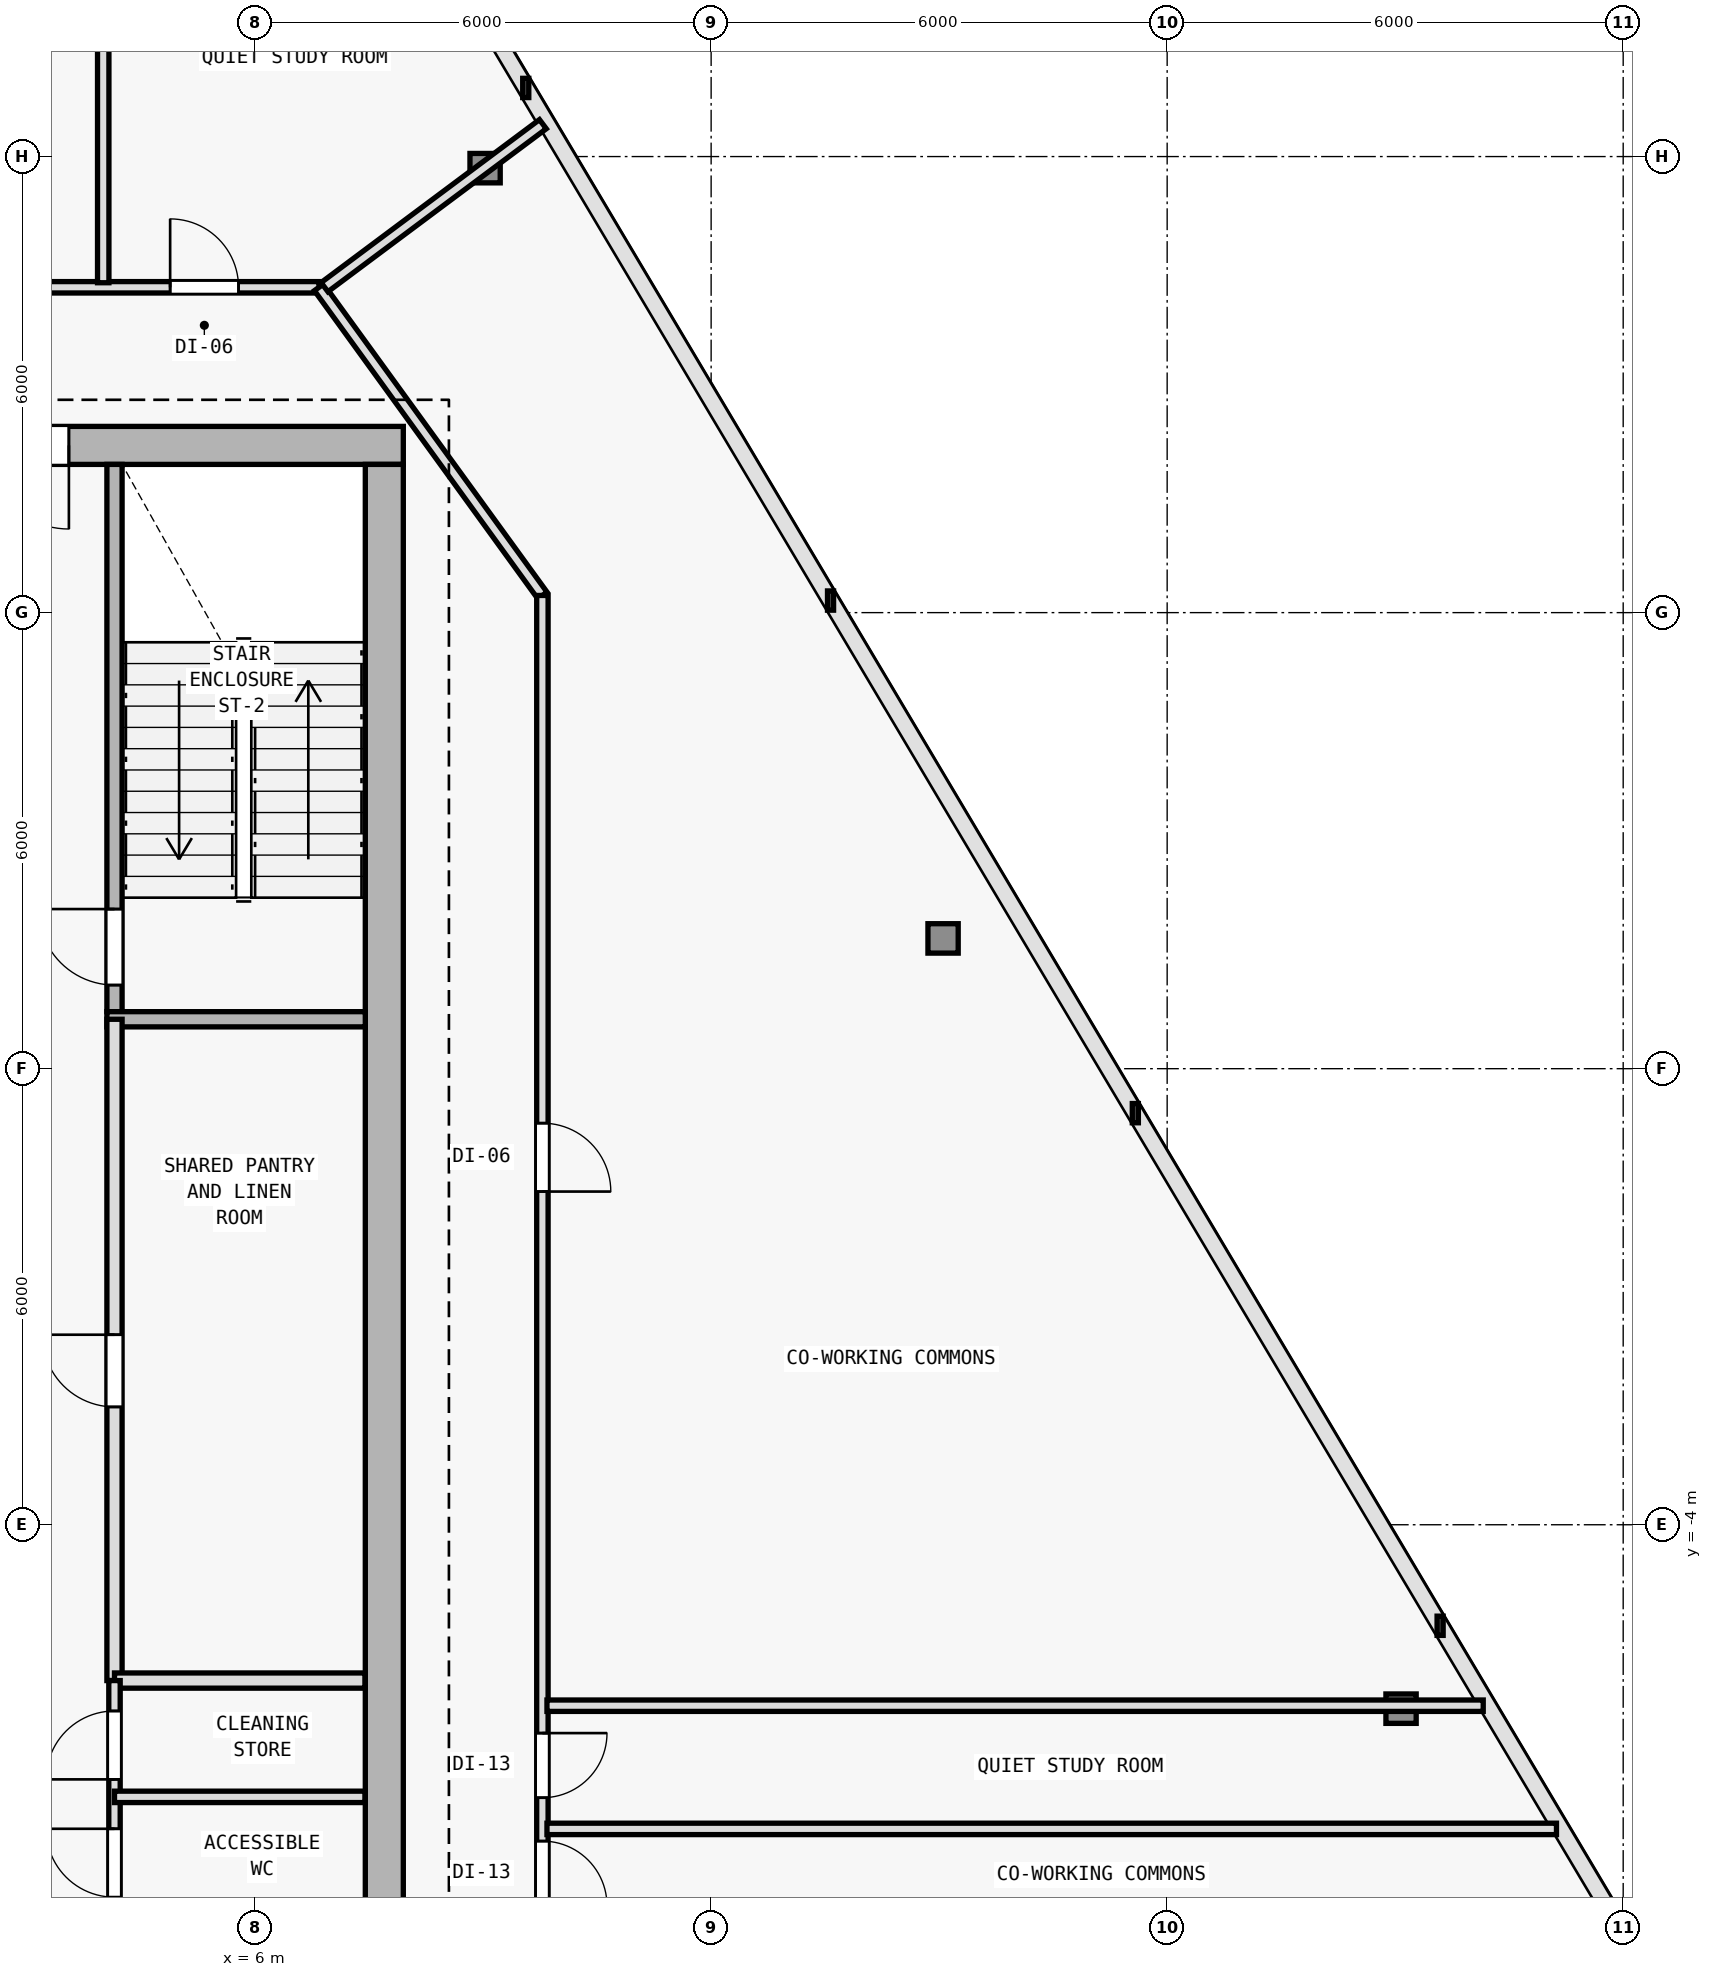
"""IFC4 building model, lengths in metres.
Left out: names, types, materials, properties, quantities, classifications, styles, units other than length and angle.
Written with IfcOpenShell. Run it as: python <this file> out.ifc"""

import sys

from ifc_helpers import new_model, si_unit, direction, frame, frame_2d, origin, origin_2d, place, context, subcontext, project, spatial, rectangle, i_section, extrude, element, fill, save


model = new_model("IFC4")
c1 = context("Model", 3, precision=1e-05, world=origin(), true_north=direction((0.0, 1.0)))
c2 = subcontext(c1, "Body", "Model", "MODEL_VIEW")
j1 = project(units=[si_unit("LENGTHUNIT", "METRE"), si_unit("PLANEANGLEUNIT", "RADIAN")], contexts=[c1])
p1 = place(None, origin())
s1 = spatial("IfcSite", under=j1, at=p1, CompositionType="ELEMENT")
p2 = place(p1, origin())
s2 = spatial("IfcBuilding", under=s1, at=p2, CompositionType="ELEMENT")
p3 = place(p2, frame((0.0, 0.0, 190.2)))
s3 = spatial("IfcBuildingStorey", under=s2, at=p3, CompositionType="ELEMENT", Elevation=190.2)
for number, where, z_axis, x_axis in (
    (1, (7.7, 10.2, 0.0), (0.0, 0.0, 1.0), (1.0, 0.0, 0.0)),
    (2, (7.7, 0.4, 0.0), (0.0, 0.0, 1.0), (1.0, 0.0, 0.0)),
):
    element("IfcColumn", number, at=place(p3, frame(where, z_axis=z_axis, x_axis=x_axis)), inside=s3, PredefinedType="COLUMN", context=c2, shape_type="SweptSolid", body=[
        extrude(i_section(OverallWidth=0.404, OverallDepth=0.407, WebThickness=0.017, FlangeThickness=0.028, FilletRadius=0.015, at=origin_2d()), origin(), (0.0, 0.0, 1.0), 4.5),
    ])
p4 = place(p3, frame((21.077, -6.42, 0.006), z_axis=(-0.020876646911, 0.017288473223, 0.999632569651), x_axis=(-0.637813971185, -0.770190455771, 0.0)))
e3 = element("IfcColumn", 3, at=p4, inside=s3, PredefinedType="COLUMN", context=c2, shape_type="SweptSolid", body=[
    extrude(i_section(OverallWidth=0.398, OverallDepth=0.387, WebThickness=0.013, FlangeThickness=0.022, FilletRadius=0.015, at=origin_2d()), origin(), (0.0, 0.0, 1.0), 4.491),
])
p5 = place(p3, frame((15.052, 3.714, 0.006), z_axis=(-0.015171571571, 0.007667353375, 0.999855507115), x_axis=(-0.451048184688, -0.89249959949, 0.0)))
e4 = element("IfcColumn", 4, at=p5, inside=s3, PredefinedType="COLUMN", context=c2, shape_type="SweptSolid", body=[
    extrude(i_section(OverallWidth=0.398, OverallDepth=0.387, WebThickness=0.013, FlangeThickness=0.022, FilletRadius=0.015, at=origin_2d()), origin(), (0.0, 0.0, 1.0), 4.49),
])
p6 = place(p3, frame((9.026, 13.847, 0.006), z_axis=(-0.009354007007, -0.002012199182, 0.999954225756), x_axis=(0.210305364179, -0.977635746993, 0.0)))
e5 = element("IfcColumn", 5, at=p6, inside=s3, PredefinedType="COLUMN", context=c2, shape_type="SweptSolid", body=[
    extrude(i_section(OverallWidth=0.398, OverallDepth=0.387, WebThickness=0.013, FlangeThickness=0.022, FilletRadius=0.015, at=origin_2d()), origin(), (0.0, 0.0, 1.0), 4.489),
])
p7 = place(p3, frame((7.95, 10.2, 0.0), z_axis=(0.0, 0.0, 1.0), x_axis=(-1.0, 0.0, 0.0)))
e6 = element("IfcWall", 6, at=p7, inside=s3, PredefinedType="SHEAR", context=c2, shape_type="SweptSolid", body=[
    extrude(rectangle(XDim=15.9, YDim=0.5, at=frame_2d((7.95, 0.0))), origin(), (0.0, 0.0, 1.0), 4.25),
])
p8 = place(p7, frame((4.4, 0.0, 0.0)))
e7 = element("IfcOpeningElement", 7, at=p8, cuts=e6, PredefinedType="OPENING", context=c2, shape_type="SweptSolid", body=[
    extrude(rectangle(XDim=1.1, YDim=2.15, at=frame_2d((0.55, 1.075))), frame((0.0, 0.26, 0.0), z_axis=(0.0, -1.0, 0.0), x_axis=(1.0, 0.0, 0.0)), (0.0, 0.0, 1.0), 0.52),
])
p9 = place(p3, frame((7.7, 9.95, 0.0), z_axis=(0.0, 0.0, 1.0), x_axis=(0.0, -1.0, 0.0)))
e8 = element("IfcWall", 8, at=p9, inside=s3, PredefinedType="SHEAR", context=c2, shape_type="SweptSolid", body=[
    extrude(rectangle(XDim=19.1, YDim=0.5, at=frame_2d((9.55, 0.0))), origin(), (0.0, 0.0, 1.0), 4.25),
])
p10 = place(p3, frame((4.15, 2.75, 0.0), z_axis=(0.0, 0.0, 1.0), x_axis=(0.0, 1.0, 0.0)))
e9 = element("IfcWall", 9, at=p10, inside=s3, PredefinedType="SOLIDWALL", context=c2, shape_type="SweptSolid", body=[
    extrude(rectangle(XDim=7.2, YDim=0.2, at=frame_2d((3.6, 0.0))), origin(), (0.0, 0.0, 1.0), 4.25),
])
p11 = place(p10, frame((0.35, 0.0, 0.0)))
e10 = element("IfcOpeningElement", 10, at=p11, cuts=e9, PredefinedType="OPENING", context=c2, shape_type="SweptSolid", body=[
    extrude(rectangle(XDim=1.0, YDim=2.15, at=frame_2d((0.5, 1.075))), frame((0.0, 0.11, 0.0), z_axis=(0.0, -1.0, 0.0), x_axis=(1.0, 0.0, 0.0)), (0.0, 0.0, 1.0), 0.22),
])
p12 = place(p3, frame((4.05, 2.65, 0.0), z_axis=(0.0, 0.0, 1.0), x_axis=(1.0, 0.0, 0.0)))
e11 = element("IfcWall", 11, at=p12, inside=s3, PredefinedType="SOLIDWALL", context=c2, shape_type="SweptSolid", body=[
    extrude(rectangle(XDim=3.4, YDim=0.2, at=frame_2d((1.7, 0.0))), origin(), (0.0, 0.0, 1.0), 4.25),
])
p13 = place(p3, frame((4.15, -6.05, 0.0), z_axis=(0.0, 0.0, 1.0), x_axis=(0.0, 1.0, 0.0)))
e12 = element("IfcWall", 12, at=p13, inside=s3, PredefinedType="SOLIDWALL", context=c2, shape_type="SweptSolid", body=[
    extrude(rectangle(XDim=8.7, YDim=0.2, at=frame_2d((4.35, 0.0))), origin(), (0.0, 0.0, 1.0), 4.25),
])
p14 = place(p13, frame((3.6, 0.0, 0.0)))
e13 = element("IfcOpeningElement", 13, at=p14, cuts=e12, PredefinedType="OPENING", context=c2, shape_type="SweptSolid", body=[
    extrude(rectangle(XDim=0.95, YDim=2.1, at=frame_2d((0.475, 1.05))), frame((0.0, 0.11, 0.0), z_axis=(0.0, -1.0, 0.0), x_axis=(1.0, 0.0, 0.0)), (0.0, 0.0, 1.0), 0.22),
])
p15 = place(p3, frame((4.15, -6.05, 0.0), z_axis=(0.0, 0.0, 1.0), x_axis=(1.0, 0.0, 0.0)))
e14 = element("IfcWall", 14, at=p15, inside=s3, PredefinedType="SOLIDWALL", context=c2, shape_type="SweptSolid", body=[
    extrude(rectangle(XDim=3.295, YDim=0.2, at=frame_2d((1.647, 0.0))), origin(), (0.0, 0.0, 1.0), 4.25),
])
p16 = place(p3, frame((4.15, -9.145, 0.0), z_axis=(0.0, 0.0, 1.0), x_axis=(0.0, 1.0, 0.0)))
e15 = element("IfcWall", 15, at=p16, inside=s3, PredefinedType="PARTITIONING", context=c2, shape_type="SweptSolid", body=[
    extrude(rectangle(XDim=3.095, YDim=0.15, at=frame_2d((1.547, 0.0))), origin(), (0.0, 0.0, 1.0), 4.25),
])
p17 = place(p16, frame((0.245, 0.0, 0.0)))
e16 = element("IfcOpeningElement", 16, at=p17, cuts=e15, PredefinedType="OPENING", context=c2, shape_type="SweptSolid", body=[
    extrude(rectangle(XDim=0.9, YDim=2.1, at=frame_2d((0.45, 1.05))), frame((0.0, 0.085, 0.0), z_axis=(0.0, -1.0, 0.0), x_axis=(1.0, 0.0, 0.0)), (0.0, 0.0, 1.0), 0.17),
])
p18 = place(p16, frame((1.795, 0.0, 0.0)))
e17 = element("IfcOpeningElement", 17, at=p18, cuts=e15, PredefinedType="OPENING", context=c2, shape_type="SweptSolid", body=[
    extrude(rectangle(XDim=0.9, YDim=2.1, at=frame_2d((0.45, 1.05))), frame((0.0, 0.085, 0.0), z_axis=(0.0, -1.0, 0.0), x_axis=(1.0, 0.0, 0.0)), (0.0, 0.0, 1.0), 0.17),
])
p19 = place(p3, frame((4.15, -7.58, 0.0), z_axis=(0.0, 0.0, 1.0), x_axis=(1.0, 0.0, 0.0)))
e18 = element("IfcWall", 18, at=p19, inside=s3, PredefinedType="PARTITIONING", context=c2, shape_type="SweptSolid", body=[
    extrude(rectangle(XDim=3.295, YDim=0.15, at=frame_2d((1.647, 0.0))), origin(), (0.0, 0.0, 1.0), 4.25),
])
p20 = place(p3, frame((-6.841, 12.28, 0.0), z_axis=(0.0, 0.0, 1.0), x_axis=(1.0, 0.0, 0.0)))
e19 = element("IfcWall", 19, at=p20, inside=s3, PredefinedType="PARTITIONING", context=c2, shape_type="SweptSolid", body=[
    extrude(rectangle(XDim=13.682, YDim=0.15, at=frame_2d((6.841, 0.0))), origin(), (0.0, 0.0, 1.0), 3.905),
])
p21 = place(p20, frame((11.723, 0.0, 0.0)))
e20 = element("IfcOpeningElement", 20, at=p21, cuts=e19, PredefinedType="OPENING", context=c2, shape_type="SweptSolid", body=[
    extrude(rectangle(XDim=0.9, YDim=2.1, at=frame_2d((0.45, 1.05))), frame((0.0, 0.085, 0.0), z_axis=(0.0, -1.0, 0.0), x_axis=(1.0, 0.0, 0.0)), (0.0, 0.0, 1.0), 0.17),
])
p22 = place(p20, frame((8.712, 0.0, 0.0)))
e21 = element("IfcOpeningElement", 21, at=p22, cuts=e19, PredefinedType="OPENING", context=c2, shape_type="SweptSolid", body=[
    extrude(rectangle(XDim=0.9, YDim=2.1, at=frame_2d((0.45, 1.05))), frame((0.0, 0.085, 0.0), z_axis=(0.0, -1.0, 0.0), x_axis=(1.0, 0.0, 0.0)), (0.0, 0.0, 1.0), 0.17),
])
p23 = place(p20, frame((6.014, 0.0, 0.0)))
e22 = element("IfcOpeningElement", 22, at=p23, cuts=e19, PredefinedType="OPENING", context=c2, shape_type="SweptSolid", body=[
    extrude(rectangle(XDim=0.9, YDim=2.1, at=frame_2d((0.45, 1.05))), frame((0.0, 0.085, 0.0), z_axis=(0.0, -1.0, 0.0), x_axis=(1.0, 0.0, 0.0)), (0.0, 0.0, 1.0), 0.17),
])
p24 = place(p20, frame((2.403, 0.0, 0.0)))
e23 = element("IfcOpeningElement", 23, at=p24, cuts=e19, PredefinedType="OPENING", context=c2, shape_type="SweptSolid", body=[
    extrude(rectangle(XDim=0.9, YDim=2.1, at=frame_2d((0.45, 1.05))), frame((0.0, 0.085, 0.0), z_axis=(0.0, -1.0, 0.0), x_axis=(1.0, 0.0, 0.0)), (0.0, 0.0, 1.0), 0.17),
])
p25 = place(p3, frame((6.841, 12.28, 0.0), z_axis=(0.0, 0.0, 1.0), x_axis=(0.586956386413, -0.809618552436, 0.0)))
e24 = element("IfcWall", 24, at=p25, inside=s3, PredefinedType="PARTITIONING", context=c2, shape_type="SweptSolid", body=[
    extrude(rectangle(XDim=5.008, YDim=0.15, at=frame_2d((2.504, 0.0))), origin(), (0.0, 0.0, 1.0), 3.775),
])
p26 = place(p3, frame((9.78, 8.226, 0.0), z_axis=(0.0, 0.0, 1.0), x_axis=(0.0, -1.0, 0.0)))
e25 = element("IfcWall", 25, at=p26, inside=s3, PredefinedType="PARTITIONING", context=c2, shape_type="SweptSolid", body=[
    extrude(rectangle(XDim=19.706, YDim=0.15, at=frame_2d((9.853, 0.0))), origin(), (0.0, 0.0, 1.0), 3.675),
])
p27 = place(p26, frame((18.038, 0.0, 0.0)))
e26 = element("IfcOpeningElement", 26, at=p27, cuts=e25, PredefinedType="OPENING", context=c2, shape_type="SweptSolid", body=[
    extrude(rectangle(XDim=0.9, YDim=2.1, at=frame_2d((0.45, 1.05))), frame((0.0, 0.085, 0.0), z_axis=(0.0, -1.0, 0.0), x_axis=(1.0, 0.0, 0.0)), (0.0, 0.0, 1.0), 0.17),
])
p28 = place(p26, frame((16.388, 0.0, 0.0)))
e27 = element("IfcOpeningElement", 27, at=p28, cuts=e25, PredefinedType="OPENING", context=c2, shape_type="SweptSolid", body=[
    extrude(rectangle(XDim=0.85, YDim=2.1, at=frame_2d((0.425, 1.05))), frame((0.0, 0.085, 0.0), z_axis=(0.0, -1.0, 0.0), x_axis=(1.0, 0.0, 0.0)), (0.0, 0.0, 1.0), 0.17),
])
p29 = place(p26, frame((14.967, 0.0, 0.0)))
e28 = element("IfcOpeningElement", 28, at=p29, cuts=e25, PredefinedType="OPENING", context=c2, shape_type="SweptSolid", body=[
    extrude(rectangle(XDim=0.85, YDim=2.1, at=frame_2d((0.425, 1.05))), frame((0.0, 0.085, 0.0), z_axis=(0.0, -1.0, 0.0), x_axis=(1.0, 0.0, 0.0)), (0.0, 0.0, 1.0), 0.17),
])
p30 = place(p26, frame((6.942, 0.0, 0.0)))
e29 = element("IfcOpeningElement", 29, at=p30, cuts=e25, PredefinedType="OPENING", context=c2, shape_type="SweptSolid", body=[
    extrude(rectangle(XDim=0.9, YDim=2.1, at=frame_2d((0.45, 1.05))), frame((0.0, 0.085, 0.0), z_axis=(0.0, -1.0, 0.0), x_axis=(1.0, 0.0, 0.0)), (0.0, 0.0, 1.0), 0.17),
])
p31 = place(p3, frame((9.84, -6.381, 0.0), z_axis=(0.0, 0.0, 1.0), x_axis=(1.0, 0.0, 0.0)))
e30 = element("IfcWall", 30, at=p31, inside=s3, PredefinedType="PARTITIONING", context=c2, shape_type="SweptSolid", body=[
    extrude(rectangle(XDim=12.318, YDim=0.15, at=frame_2d((6.159, 0.0))), origin(), (0.0, 0.0, 1.0), 3.725),
])
p32 = place(p3, frame((6.913, 12.282, 0.0), z_axis=(0.0, 0.0, 1.0), x_axis=(0.80143603656, 0.598080495672, 0.0)))
e31 = element("IfcWall", 31, at=p32, inside=s3, PredefinedType="PARTITIONING", context=c2, shape_type="SweptSolid", body=[
    extrude(rectangle(XDim=3.585, YDim=0.15, at=frame_2d((1.792, 0.0))), origin(), (0.0, 0.0, 1.0), 3.835),
])
p33 = place(p3, frame((9.84, -8.001, 0.0), z_axis=(0.0, 0.0, 1.0), x_axis=(1.0, 0.0, 0.0)))
e32 = element("IfcWall", 32, at=p33, inside=s3, PredefinedType="PARTITIONING", context=c2, shape_type="SweptSolid", body=[
    extrude(rectangle(XDim=13.282, YDim=0.15, at=frame_2d((6.641, 0.0))), origin(), (0.0, 0.0, 1.0), 3.725),
])
p34 = place(p3, frame((4.002, 12.34, 0.0), z_axis=(0.0, 0.0, 1.0), x_axis=(0.0, 1.0, 0.0)))
e33 = element("IfcWall", 33, at=p34, inside=s3, PredefinedType="PARTITIONING", context=c2, shape_type="SweptSolid", body=[
    extrude(rectangle(XDim=8.463, YDim=0.15, at=frame_2d((4.231, 0.0))), origin(), (0.0, 0.0, 1.0), 3.835),
])
p35 = place(p8, origin())
e34 = element("IfcDoor", 34, at=p35, inside=s3, OperationType="SINGLE_SWING_LEFT", PredefinedType="DOOR", context=c2, shape_type="SweptSolid", body=[
    extrude(rectangle(XDim=1.1, YDim=2.15, at=frame_2d((0.55, 1.075))), frame((0.0, 0.025, 0.0), z_axis=(0.0, -1.0, 0.0), x_axis=(1.0, 0.0, 0.0)), (0.0, 0.0, 1.0), 0.05),
])
fill(e7, e34)
p36 = place(p11, origin())
e35 = element("IfcDoor", 35, at=p36, inside=s3, OperationType="SINGLE_SWING_RIGHT", PredefinedType="DOOR", context=c2, shape_type="SweptSolid", body=[
    extrude(rectangle(XDim=1.0, YDim=2.15, at=frame_2d((0.5, 1.075))), frame((0.0, 0.025, 0.0), z_axis=(0.0, -1.0, 0.0), x_axis=(1.0, 0.0, 0.0)), (0.0, 0.0, 1.0), 0.05),
])
fill(e10, e35)
p37 = place(p14, origin())
e36 = element("IfcDoor", 36, at=p37, inside=s3, OperationType="SINGLE_SWING_RIGHT", PredefinedType="DOOR", context=c2, shape_type="SweptSolid", body=[
    extrude(rectangle(XDim=0.95, YDim=2.1, at=frame_2d((0.475, 1.05))), frame((0.0, 0.025, 0.0), z_axis=(0.0, -1.0, 0.0), x_axis=(1.0, 0.0, 0.0)), (0.0, 0.0, 1.0), 0.05),
])
fill(e13, e36)
p38 = place(p17, origin())
e37 = element("IfcDoor", 37, at=p38, inside=s3, OperationType="SINGLE_SWING_RIGHT", PredefinedType="DOOR", context=c2, shape_type="SweptSolid", body=[
    extrude(rectangle(XDim=0.9, YDim=2.1, at=frame_2d((0.45, 1.05))), frame((0.0, 0.025, 0.0), z_axis=(0.0, -1.0, 0.0), x_axis=(1.0, 0.0, 0.0)), (0.0, 0.0, 1.0), 0.05),
])
fill(e16, e37)
p39 = place(p18, origin())
e38 = element("IfcDoor", 38, at=p39, inside=s3, OperationType="SINGLE_SWING_LEFT", PredefinedType="DOOR", context=c2, shape_type="SweptSolid", body=[
    extrude(rectangle(XDim=0.9, YDim=2.1, at=frame_2d((0.45, 1.05))), frame((0.0, 0.025, 0.0), z_axis=(0.0, -1.0, 0.0), x_axis=(1.0, 0.0, 0.0)), (0.0, 0.0, 1.0), 0.05),
])
fill(e17, e38)
p40 = place(p28, origin())
e39 = element("IfcDoor", 39, at=p40, inside=s3, OperationType="SINGLE_SWING_RIGHT", PredefinedType="DOOR", context=c2, shape_type="SweptSolid", body=[
    extrude(rectangle(XDim=0.85, YDim=2.1, at=frame_2d((0.425, 1.05))), frame((0.0, 0.025, 0.0), z_axis=(0.0, -1.0, 0.0), x_axis=(1.0, 0.0, 0.0)), (0.0, 0.0, 1.0), 0.05),
])
fill(e27, e39)
p41 = place(p29, origin())
e40 = element("IfcDoor", 40, at=p41, inside=s3, OperationType="SINGLE_SWING_LEFT", PredefinedType="DOOR", context=c2, shape_type="SweptSolid", body=[
    extrude(rectangle(XDim=0.85, YDim=2.1, at=frame_2d((0.425, 1.05))), frame((0.0, 0.025, 0.0), z_axis=(0.0, -1.0, 0.0), x_axis=(1.0, 0.0, 0.0)), (0.0, 0.0, 1.0), 0.05),
])
fill(e28, e40)
p42 = place(p30, origin())
e41 = element("IfcDoor", 41, at=p42, inside=s3, OperationType="SINGLE_SWING_RIGHT", PredefinedType="DOOR", context=c2, shape_type="SweptSolid", body=[
    extrude(rectangle(XDim=0.9, YDim=2.1, at=frame_2d((0.45, 1.05))), frame((0.0, 0.025, 0.0), z_axis=(0.0, -1.0, 0.0), x_axis=(1.0, 0.0, 0.0)), (0.0, 0.0, 1.0), 0.05),
])
fill(e29, e41)
p43 = place(p21, origin())
e42 = element("IfcDoor", 42, at=p43, inside=s3, OperationType="SINGLE_SWING_LEFT", PredefinedType="DOOR", context=c2, shape_type="SweptSolid", body=[
    extrude(rectangle(XDim=0.9, YDim=2.1, at=frame_2d((0.45, 1.05))), frame((0.0, 0.025, 0.0), z_axis=(0.0, -1.0, 0.0), x_axis=(1.0, 0.0, 0.0)), (0.0, 0.0, 1.0), 0.05),
])
fill(e20, e42)
save(model, sys.argv[1])
